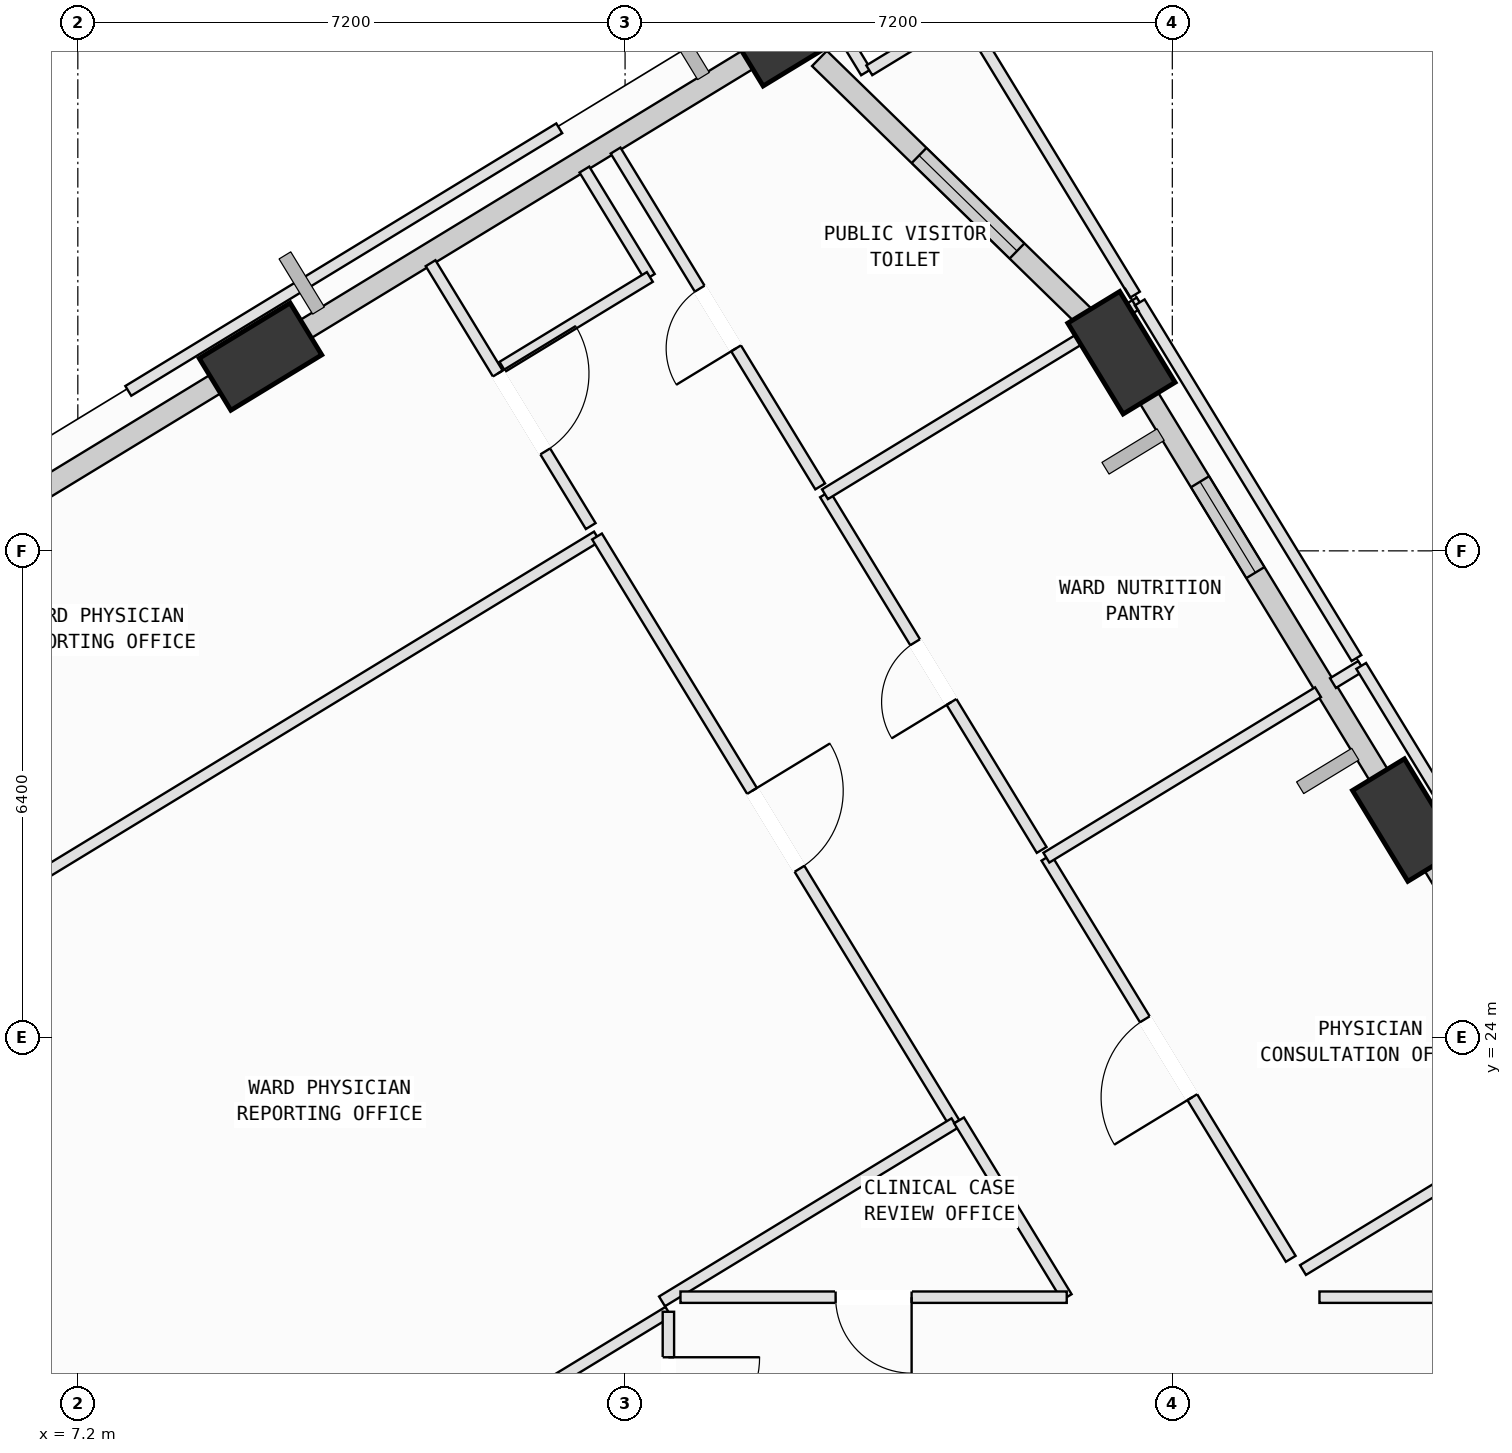
"""IFC4 building model, lengths in metres.
Left out: names, types, materials, properties, quantities, classifications, styles, units other than length and angle.
Written with IfcOpenShell. Run it as: python <this file> out.ifc"""

import sys

from ifc_helpers import new_model, si_unit, direction, frame, frame_2d, origin, origin_2d, place, context, subcontext, project, spatial, rectangle, extrude, element, fill, save


model = new_model("IFC4")
c1 = context("Model", 3, precision=1e-05, world=origin(), true_north=direction((0.0, 1.0)))
c2 = subcontext(c1, "Body", "Model", "MODEL_VIEW")
j1 = project(units=[si_unit("LENGTHUNIT", "METRE"), si_unit("PLANEANGLEUNIT", "RADIAN")], contexts=[c1])
p1 = place(None, origin())
s1 = spatial("IfcSite", under=j1, at=p1, CompositionType="ELEMENT")
p2 = place(p1, origin())
s2 = spatial("IfcBuilding", under=s1, at=p2, CompositionType="ELEMENT")
p3 = place(p2, frame((0.0, 0.0, 157.8)))
s3 = spatial("IfcBuildingStorey", under=s2, at=p3, CompositionType="ELEMENT", Elevation=157.8)
p4 = place(p3, frame((24.677, 26.858, 0.002), z_axis=(-0.008180309304, -0.037055580205, 0.999279723859), x_axis=(-0.324069376785, 0.945478073215, 0.032407593253)))
e1 = element("IfcColumn", 1, at=p4, inside=s3, PredefinedType="COLUMN", context=c2, shape_type="SweptSolid", body=[
    extrude(rectangle(XDim=1.4, YDim=0.8, at=origin_2d()), origin(), (0.0, 0.0, 1.0), 3.999),
])
p5 = place(p3, frame((20.931, 33.007, 0.002), z_axis=(-0.033534518386, -0.052679679792, 0.998048239021), x_axis=(0.018821904997, 0.998399508653, 0.053330638599)))
e2 = element("IfcColumn", 2, at=p5, inside=s3, PredefinedType="COLUMN", context=c2, shape_type="SweptSolid", body=[
    extrude(rectangle(XDim=1.4, YDim=0.8, at=origin_2d()), origin(), (0.0, 0.0, 1.0), 4.004),
])
p6 = place(p3, frame((16.606, 37.222, 0.002), z_axis=(-0.050696300595, -0.070597489424, 0.996215779635), x_axis=(0.995994383775, -0.077139317249, 0.045218505326)))
e3 = element("IfcColumn", 3, at=p6, inside=s3, PredefinedType="COLUMN", context=c2, shape_type="SweptSolid", body=[
    extrude(rectangle(XDim=1.4, YDim=0.8, at=origin_2d()), origin(), (0.0, 0.0, 1.0), 4.011),
])
p7 = place(p3, frame((9.603, 32.956, 0.002), z_axis=(-0.032808767098, -0.099155385009, 0.994530941914), x_axis=(0.973312929666, 0.222955959714, 0.054337657051)))
e4 = element("IfcColumn", 4, at=p7, inside=s3, PredefinedType="COLUMN", context=c2, shape_type="SweptSolid", body=[
    extrude(rectangle(XDim=1.4, YDim=0.8, at=origin_2d()), origin(), (0.0, 0.0, 1.0), 4.018),
])
p8 = place(p3, frame((28.479, 20.617, 0.0), z_axis=(0.0, 0.0, 1.0), x_axis=(-0.520241368048, 0.854019273185, 0.0)))
e5 = element("IfcWall", 5, at=p8, inside=s3, PredefinedType="SOLIDWALL", context=c2, shape_type="SweptSolid", body=[
    extrude(rectangle(XDim=6.76, YDim=0.28, at=frame_2d((3.38, 0.0))), origin(), (0.0, 0.0, 1.0), 3.165),
])
p9 = place(p3, frame((24.448, 27.232, 0.0), z_axis=(0.0, 0.0, 1.0), x_axis=(-0.520230695159, 0.854025774678, 0.0)))
e6 = element("IfcWall", 6, at=p9, inside=s3, PredefinedType="SOLIDWALL", context=c2, shape_type="SweptSolid", body=[
    extrude(rectangle(XDim=6.223, YDim=0.28, at=frame_2d((3.111, 0.0))), origin(), (0.0, 0.0, 1.0), 3.165),
])
p10 = place(p9, frame((3.374, 0.0, 0.75)))
e7 = element("IfcOpeningElement", 7, at=p10, cuts=e6, PredefinedType="OPENING", context=c2, shape_type="SweptSolid", body=[
    extrude(rectangle(XDim=1.4, YDim=1.85, at=frame_2d((0.7, 0.925))), frame((0.0, 0.15, 0.0), z_axis=(0.0, -1.0, 0.0), x_axis=(1.0, 0.0, 0.0)), (0.0, 0.0, 1.0), 0.3),
])
p11 = place(p3, frame((16.958, 36.879, 0.0), z_axis=(0.0, 0.0, 1.0), x_axis=(0.716061838251, -0.698036849888, 0.0)))
e8 = element("IfcWall", 8, at=p11, inside=s3, PredefinedType="SOLIDWALL", context=c2, shape_type="SweptSolid", body=[
    extrude(rectangle(XDim=5.093, YDim=0.28, at=frame_2d((2.546, 0.0))), origin(), (0.0, 0.0, 1.0), 3.165),
])
p12 = place(p11, frame((1.83, 0.0, 0.75)))
e9 = element("IfcOpeningElement", 9, at=p12, cuts=e8, PredefinedType="OPENING", context=c2, shape_type="SweptSolid", body=[
    extrude(rectangle(XDim=1.8, YDim=2.05, at=frame_2d((0.9, 1.025))), frame((0.0, 0.15, 0.0), z_axis=(0.0, -1.0, 0.0), x_axis=(1.0, 0.0, 0.0)), (0.0, 0.0, 1.0), 0.3),
])
p13 = place(p3, frame((9.874, 33.121, 0.0), z_axis=(0.0, 0.0, 1.0), x_axis=(0.854014635071, 0.52024898182, 0.0)))
e10 = element("IfcWall", 10, at=p13, inside=s3, PredefinedType="SOLIDWALL", context=c2, shape_type="SweptSolid", body=[
    extrude(rectangle(XDim=7.231, YDim=0.28, at=frame_2d((3.615, 0.0))), origin(), (0.0, 0.0, 1.0), 3.165),
])
p14 = place(p3, frame((2.851, 28.842, 0.0), z_axis=(0.0, 0.0, 1.0), x_axis=(0.854006543664, 0.520262264036, 0.0)))
e11 = element("IfcWall", 11, at=p14, inside=s3, PredefinedType="SOLIDWALL", context=c2, shape_type="SweptSolid", body=[
    extrude(rectangle(XDim=7.27, YDim=0.28, at=frame_2d((3.635, 0.0))), origin(), (0.0, 0.0, 1.0), 3.165),
])
p15 = place(p3, frame((7.173, 15.638, 0.0), z_axis=(0.0, 0.0, 1.0), x_axis=(0.854000204459, 0.52027266965, 0.0)))
e12 = element("IfcWall", 12, at=p15, inside=s3, PredefinedType="PARTITIONING", context=c2, shape_type="SweptSolid", body=[
    extrude(rectangle(XDim=9.13, YDim=0.15, at=frame_2d((4.565, 0.0))), origin(), (0.0, 0.0, 1.0), 3.78),
])
p16 = place(p3, frame((14.97, 20.388, 0.0), z_axis=(0.0, 0.0, 1.0), x_axis=(0.0, -1.0, 0.0)))
e13 = element("IfcWall", 13, at=p16, inside=s3, PredefinedType="PARTITIONING", context=c2, shape_type="SweptSolid", body=[
    extrude(rectangle(XDim=2.158, YDim=0.15, at=frame_2d((1.079, 0.0))), origin(), (0.0, 0.0, 1.0), 3.78),
])
p17 = place(p16, frame((0.598, 0.0, 0.0)))
e14 = element("IfcOpeningElement", 14, at=p17, cuts=e13, PredefinedType="OPENING", context=c2, shape_type="SweptSolid", body=[
    extrude(rectangle(XDim=1.2, YDim=2.15, at=frame_2d((0.6, 1.075))), frame((0.0, 0.085, 0.0), z_axis=(0.0, -1.0, 0.0), x_axis=(1.0, 0.0, 0.0)), (0.0, 0.0, 1.0), 0.17),
])
p18 = place(p3, frame((2.092, 23.316, 0.0), z_axis=(0.0, 0.0, 1.0), x_axis=(0.854007963695, 0.520259933059, 0.0)))
e15 = element("IfcWall", 15, at=p18, inside=s3, PredefinedType="PARTITIONING", context=c2, shape_type="SweptSolid", body=[
    extrude(rectangle(XDim=13.98, YDim=0.15, at=frame_2d((6.99, 0.0))), origin(), (0.0, 0.0, 1.0), 3.78),
])
p19 = place(p3, frame((14.031, 30.589, 0.0), z_axis=(0.0, 0.0, 1.0), x_axis=(0.520239078164, -0.854020668105, 0.0)))
e16 = element("IfcWall", 16, at=p19, inside=s3, PredefinedType="PARTITIONING", context=c2, shape_type="SweptSolid", body=[
    extrude(rectangle(XDim=9.04, YDim=0.15, at=frame_2d((4.52, 0.0))), origin(), (0.0, 0.0, 1.0), 3.78),
])
p20 = place(p19, frame((3.92, 0.0, 0.0)))
e17 = element("IfcOpeningElement", 17, at=p20, cuts=e16, PredefinedType="OPENING", context=c2, shape_type="SweptSolid", body=[
    extrude(rectangle(XDim=1.2, YDim=2.15, at=frame_2d((0.6, 1.075))), frame((0.0, 0.085, 0.0), z_axis=(0.0, -1.0, 0.0), x_axis=(1.0, 0.0, 0.0)), (0.0, 0.0, 1.0), 0.17),
])
p21 = place(p3, frame((18.734, 22.869, 0.0), z_axis=(0.0, 0.0, 1.0), x_axis=(-0.854021673807, -0.520237427208, 0.0)))
e18 = element("IfcWall", 18, at=p21, inside=s3, PredefinedType="PARTITIONING", context=c2, shape_type="SweptSolid", body=[
    extrude(rectangle(XDim=4.506, YDim=0.15, at=frame_2d((2.253, 0.0))), origin(), (0.0, 0.0, 1.0), 3.78),
])
p22 = place(p3, frame((8.971, 32.77, 0.0), z_axis=(0.0, 0.0, 1.0), x_axis=(0.854178789285, 0.519979418762, 0.0)))
e19 = element("IfcWall", 19, at=p22, inside=s3, PredefinedType="PARTITIONING", context=c2, shape_type="SweptSolid", body=[
    extrude(rectangle(XDim=0.954, YDim=0.15, at=frame_2d((0.477, 0.0))), origin(), (0.0, 0.0, 1.0), 3.78),
])
p23 = place(p3, frame((11.841, 34.185, 0.0), z_axis=(0.0, 0.0, 1.0), x_axis=(0.520210820935, -0.854037880765, 0.0)))
e20 = element("IfcWall", 20, at=p23, inside=s3, PredefinedType="PARTITIONING", context=c2, shape_type="SweptSolid", body=[
    extrude(rectangle(XDim=4.05, YDim=0.15, at=frame_2d((2.025, 0.0))), origin(), (0.0, 0.0, 1.0), 3.78),
])
p24 = place(p23, frame((1.7, 0.0, 0.0)))
e21 = element("IfcOpeningElement", 21, at=p24, cuts=e20, PredefinedType="OPENING", context=c2, shape_type="SweptSolid", body=[
    extrude(rectangle(XDim=1.2, YDim=2.15, at=frame_2d((0.6, 1.075))), frame((0.0, 0.085, 0.0), z_axis=(0.0, -1.0, 0.0), x_axis=(1.0, 0.0, 0.0)), (0.0, 0.0, 1.0), 0.17),
])
p25 = place(p3, frame((27.809, 20.579, 0.0), z_axis=(0.0, 0.0, 1.0), x_axis=(-0.999999973887, 0.000228532246, 0.0)))
e22 = element("IfcWall", 22, at=p25, inside=s3, PredefinedType="PARTITIONING", context=c2, shape_type="SweptSolid", body=[
    extrude(rectangle(XDim=4.273, YDim=0.15, at=frame_2d((2.137, 0.0))), origin(), (0.0, 0.0, 1.0), 3.78),
])
p26 = place(p25, frame((1.636, 0.0, 0.0)))
e23 = element("IfcOpeningElement", 23, at=p26, cuts=e22, PredefinedType="OPENING", context=c2, shape_type="SweptSolid", body=[
    extrude(rectangle(XDim=1.0, YDim=2.12, at=frame_2d((0.5, 1.06))), frame((0.0, 0.085, 0.0), z_axis=(0.0, -1.0, 0.0), x_axis=(1.0, 0.0, 0.0)), (0.0, 0.0, 1.0), 0.17),
])
p27 = place(p3, frame((23.319, 20.937, 0.0), z_axis=(0.0, 0.0, 1.0), x_axis=(0.853962989995, 0.520333750316, 0.0)))
e24 = element("IfcWall", 24, at=p27, inside=s3, PredefinedType="PARTITIONING", context=c2, shape_type="SweptSolid", body=[
    extrude(rectangle(XDim=4.124, YDim=0.15, at=frame_2d((2.062, 0.0))), origin(), (0.0, 0.0, 1.0), 3.78),
])
p28 = place(p3, frame((23.158, 21.085, 0.0), z_axis=(0.0, 0.0, 1.0), x_axis=(-0.520195067616, 0.854047476214, 0.0)))
e25 = element("IfcWall", 25, at=p28, inside=s3, PredefinedType="PARTITIONING", context=c2, shape_type="SweptSolid", body=[
    extrude(rectangle(XDim=6.18, YDim=0.15, at=frame_2d((3.09, 0.0))), origin(), (0.0, 0.0, 1.0), 3.78),
])
p29 = place(p28, frame((2.49, 0.0, 0.0)))
e26 = element("IfcOpeningElement", 26, at=p29, cuts=e25, PredefinedType="OPENING", context=c2, shape_type="SweptSolid", body=[
    extrude(rectangle(XDim=1.2, YDim=2.15, at=frame_2d((0.6, 1.075))), frame((0.0, 0.085, 0.0), z_axis=(0.0, -1.0, 0.0), x_axis=(1.0, 0.0, 0.0)), (0.0, 0.0, 1.0), 0.17),
])
p30 = place(p3, frame((19.943, 26.363, 0.0), z_axis=(0.0, 0.0, 1.0), x_axis=(0.854035162243, 0.520215283948, 0.0)))
e27 = element("IfcWall", 27, at=p30, inside=s3, PredefinedType="PARTITIONING", context=c2, shape_type="SweptSolid", body=[
    extrude(rectangle(XDim=4.185, YDim=0.15, at=frame_2d((2.092, 0.0))), origin(), (0.0, 0.0, 1.0), 3.78),
])
p31 = place(p3, frame((23.714, 28.66, 0.0), z_axis=(0.0, 0.0, 1.0), x_axis=(0.853851017382, 0.520517473401, 0.0)))
e28 = element("IfcWall", 28, at=p31, inside=s3, PredefinedType="PARTITIONING", context=c2, shape_type="SweptSolid", body=[
    extrude(rectangle(XDim=0.434, YDim=0.15, at=frame_2d((0.217, 0.0))), origin(), (0.0, 0.0, 1.0), 3.78),
])
p32 = place(p3, frame((24.085, 28.886, 0.0), z_axis=(0.0, 0.0, 1.0), x_axis=(0.520223881185, -0.85402992538, 0.0)))
e29 = element("IfcWall", 29, at=p32, inside=s3, PredefinedType="PARTITIONING", context=c2, shape_type="SweptSolid", body=[
    extrude(rectangle(XDim=6.18, YDim=0.15, at=frame_2d((3.09, 0.0))), origin(), (0.0, 0.0, 1.0), 3.78),
])
p33 = place(p3, frame((19.881, 26.465, 0.0), z_axis=(0.0, 0.0, 1.0), x_axis=(-0.520269153485, 0.854002346561, 0.0)))
e30 = element("IfcWall", 30, at=p33, inside=s3, PredefinedType="PARTITIONING", context=c2, shape_type="SweptSolid", body=[
    extrude(rectangle(XDim=5.48, YDim=0.15, at=frame_2d((2.74, 0.0))), origin(), (0.0, 0.0, 1.0), 3.78),
])
p34 = place(p33, frame((2.28, 0.0, 0.0)))
e31 = element("IfcOpeningElement", 31, at=p34, cuts=e30, PredefinedType="OPENING", context=c2, shape_type="SweptSolid", body=[
    extrude(rectangle(XDim=0.92, YDim=2.1, at=frame_2d((0.46, 1.05))), frame((0.0, 0.085, 0.0), z_axis=(0.0, -1.0, 0.0), x_axis=(1.0, 0.0, 0.0)), (0.0, 0.0, 1.0), 0.17),
])
p35 = place(p3, frame((17.03, 31.145, 0.0), z_axis=(0.0, 0.0, 1.0), x_axis=(0.853935379197, 0.520379061988, 0.0)))
e32 = element("IfcWall", 32, at=p35, inside=s3, PredefinedType="PARTITIONING", context=c2, shape_type="SweptSolid", body=[
    extrude(rectangle(XDim=4.068, YDim=0.15, at=frame_2d((2.034, 0.0))), origin(), (0.0, 0.0, 1.0), 3.78),
])
p36 = place(p3, frame((20.703, 33.384, 0.0), z_axis=(0.0, 0.0, 1.0), x_axis=(0.854172741776, 0.519989352975, 0.0)))
e33 = element("IfcWall", 33, at=p36, inside=s3, PredefinedType="PARTITIONING", context=c2, shape_type="SweptSolid", body=[
    extrude(rectangle(XDim=0.548, YDim=0.15, at=frame_2d((0.274, 0.0))), origin(), (0.0, 0.0, 1.0), 3.78),
])
p37 = place(p3, frame((21.171, 33.669, 0.0), z_axis=(0.0, 0.0, 1.0), x_axis=(0.520399103796, -0.853923165611, 0.0)))
e34 = element("IfcWall", 34, at=p37, inside=s3, PredefinedType="PARTITIONING", context=c2, shape_type="SweptSolid", body=[
    extrude(rectangle(XDim=5.48, YDim=0.15, at=frame_2d((2.74, 0.0))), origin(), (0.0, 0.0, 1.0), 3.78),
])
p38 = place(p3, frame((18.851, 37.478, 0.0), z_axis=(0.0, 0.0, 1.0), x_axis=(0.52017533127, -0.854059497189, 0.0)))
e35 = element("IfcWall", 35, at=p38, inside=s3, PredefinedType="PARTITIONING", context=c2, shape_type="SweptSolid", body=[
    extrude(rectangle(XDim=4.341, YDim=0.15, at=frame_2d((2.17, 0.0))), origin(), (0.0, 0.0, 1.0), 3.78),
])
p39 = place(p3, frame((16.967, 31.248, 0.0), z_axis=(0.0, 0.0, 1.0), x_axis=(-0.520277703675, 0.853997137618, 0.0)))
e36 = element("IfcWall", 36, at=p39, inside=s3, PredefinedType="PARTITIONING", context=c2, shape_type="SweptSolid", body=[
    extrude(rectangle(XDim=5.174, YDim=0.15, at=frame_2d((2.587, 0.0))), origin(), (0.0, 0.0, 1.0), 3.78),
])
p40 = place(p39, frame((2.127, 0.0, 0.0)))
e37 = element("IfcOpeningElement", 37, at=p40, cuts=e36, PredefinedType="OPENING", context=c2, shape_type="SweptSolid", body=[
    extrude(rectangle(XDim=0.92, YDim=2.1, at=frame_2d((0.46, 1.05))), frame((0.0, 0.085, 0.0), z_axis=(0.0, -1.0, 0.0), x_axis=(1.0, 0.0, 0.0)), (0.0, 0.0, 1.0), 0.17),
])
p41 = place(p3, frame((17.003, 37.628, 0.0), z_axis=(0.0, 0.0, 1.0), x_axis=(0.52028085322, -0.853995218823, 0.0)))
e38 = element("IfcWall", 38, at=p41, inside=s3, PredefinedType="PARTITIONING", context=c2, shape_type="SweptSolid", body=[
    extrude(rectangle(XDim=1.09, YDim=0.15, at=frame_2d((0.545, 0.0))), origin(), (0.0, 0.0, 1.0), 3.78),
])
p42 = place(p3, frame((17.613, 36.723, 0.0), z_axis=(0.0, 0.0, 1.0), x_axis=(0.85369973311, 0.520765557317, 0.0)))
e39 = element("IfcWall", 39, at=p42, inside=s3, PredefinedType="PARTITIONING", context=c2, shape_type="SweptSolid", body=[
    extrude(rectangle(XDim=1.4, YDim=0.15, at=frame_2d((0.7, 0.0))), origin(), (0.0, 0.0, 1.0), 3.78),
])
p43 = place(p3, frame((7.864, 32.505, 0.0), z_axis=(0.0, 0.0, 1.0), x_axis=(0.853942838584, 0.520366821032, 0.0)))
e40 = element("IfcWall", 40, at=p43, inside=s3, PredefinedType="PARTITIONING", context=c2, shape_type="SweptSolid", body=[
    extrude(rectangle(XDim=6.64, YDim=0.15, at=frame_2d((3.32, 0.0))), origin(), (0.0, 0.0, 1.0), 3.78),
])
p44 = place(p3, frame((13.865, 35.417, 0.0), z_axis=(0.0, 0.0, 1.0), x_axis=(0.520363448518, -0.853944893683, 0.0)))
e41 = element("IfcWall", 41, at=p44, inside=s3, PredefinedType="PARTITIONING", context=c2, shape_type="SweptSolid", body=[
    extrude(rectangle(XDim=1.655, YDim=0.15, at=frame_2d((0.827, 0.0))), origin(), (0.0, 0.0, 1.0), 3.78),
])
p45 = place(p3, frame((14.726, 34.004, 0.0), z_axis=(0.0, 0.0, 1.0), x_axis=(-0.854067702897, -0.520161858337, 0.0)))
e42 = element("IfcWall", 42, at=p45, inside=s3, PredefinedType="PARTITIONING", context=c2, shape_type="SweptSolid", body=[
    extrude(rectangle(XDim=2.27, YDim=0.15, at=frame_2d((1.135, 0.0))), origin(), (0.0, 0.0, 1.0), 3.78),
])
p46 = place(p3, frame((18.794, 22.906, 0.0), z_axis=(0.0, 0.0, 1.0), x_axis=(0.520271097481, -0.854001162251, 0.0)))
e43 = element("IfcWall", 43, at=p46, inside=s3, PredefinedType="PARTITIONING", context=c2, shape_type="SweptSolid", body=[
    extrude(rectangle(XDim=2.724, YDim=0.15, at=frame_2d((1.362, 0.0))), origin(), (0.0, 0.0, 1.0), 3.78),
])
p47 = place(p3, frame((20.211, 20.58, 0.0), z_axis=(0.0, 0.0, 1.0), x_axis=(-1.0, 0.0, 0.0)))
e44 = element("IfcWall", 44, at=p47, inside=s3, PredefinedType="PARTITIONING", context=c2, shape_type="SweptSolid", body=[
    extrude(rectangle(XDim=5.082, YDim=0.15, at=frame_2d((2.541, 0.0))), origin(), (0.0, 0.0, 1.0), 3.78),
])
p48 = place(p47, frame((2.041, 0.0, 0.0)))
e45 = element("IfcOpeningElement", 45, at=p48, cuts=e44, PredefinedType="OPENING", context=c2, shape_type="SweptSolid", body=[
    extrude(rectangle(XDim=1.0, YDim=2.12, at=frame_2d((0.5, 1.06))), frame((0.0, 0.085, 0.0), z_axis=(0.0, -1.0, 0.0), x_axis=(1.0, 0.0, 0.0)), (0.0, 0.0, 1.0), 0.17),
])
p49 = place(p10, origin())
e46 = element("IfcWindow", 46, at=p49, inside=s3, PartitioningType="SINGLE_PANEL", PredefinedType="WINDOW", context=c2, shape_type="SweptSolid", body=[
    extrude(rectangle(XDim=1.4, YDim=1.85, at=frame_2d((0.7, 0.925))), frame((0.0, 0.03, 0.0), z_axis=(0.0, -1.0, 0.0), x_axis=(1.0, 0.0, 0.0)), (0.0, 0.0, 1.0), 0.06),
])
fill(e7, e46)
p50 = place(p12, origin())
e47 = element("IfcWindow", 47, at=p50, inside=s3, PartitioningType="SINGLE_PANEL", PredefinedType="WINDOW", context=c2, shape_type="SweptSolid", body=[
    extrude(rectangle(XDim=1.8, YDim=2.05, at=frame_2d((0.9, 1.025))), frame((0.0, 0.03, 0.0), z_axis=(0.0, -1.0, 0.0), x_axis=(1.0, 0.0, 0.0)), (0.0, 0.0, 1.0), 0.06),
])
fill(e9, e47)
p51 = place(p17, origin())
e48 = element("IfcDoor", 48, at=p51, inside=s3, OperationType="SINGLE_SWING_LEFT", PredefinedType="DOOR", context=c2, shape_type="SweptSolid", body=[
    extrude(rectangle(XDim=1.2, YDim=2.15, at=frame_2d((0.6, 1.075))), frame((0.0, 0.025, 0.0), z_axis=(0.0, -1.0, 0.0), x_axis=(1.0, 0.0, 0.0)), (0.0, 0.0, 1.0), 0.05),
])
fill(e14, e48)
p52 = place(p20, origin())
e49 = element("IfcDoor", 49, at=p52, inside=s3, OperationType="SINGLE_SWING_LEFT", PredefinedType="DOOR", context=c2, shape_type="SweptSolid", body=[
    extrude(rectangle(XDim=1.2, YDim=2.15, at=frame_2d((0.6, 1.075))), frame((0.0, 0.025, 0.0), z_axis=(0.0, -1.0, 0.0), x_axis=(1.0, 0.0, 0.0)), (0.0, 0.0, 1.0), 0.05),
])
fill(e17, e49)
p53 = place(p24, origin())
e50 = element("IfcDoor", 50, at=p53, inside=s3, OperationType="SINGLE_SWING_LEFT", PredefinedType="DOOR", context=c2, shape_type="SweptSolid", body=[
    extrude(rectangle(XDim=1.2, YDim=2.15, at=frame_2d((0.6, 1.075))), frame((0.0, 0.025, 0.0), z_axis=(0.0, -1.0, 0.0), x_axis=(1.0, 0.0, 0.0)), (0.0, 0.0, 1.0), 0.05),
])
fill(e21, e50)
p54 = place(p29, origin())
e51 = element("IfcDoor", 51, at=p54, inside=s3, OperationType="SINGLE_SWING_LEFT", PredefinedType="DOOR", context=c2, shape_type="SweptSolid", body=[
    extrude(rectangle(XDim=1.2, YDim=2.15, at=frame_2d((0.6, 1.075))), frame((0.0, 0.025, 0.0), z_axis=(0.0, -1.0, 0.0), x_axis=(1.0, 0.0, 0.0)), (0.0, 0.0, 1.0), 0.05),
])
fill(e26, e51)
p55 = place(p34, origin())
e52 = element("IfcDoor", 52, at=p55, inside=s3, OperationType="SINGLE_SWING_LEFT", PredefinedType="DOOR", context=c2, shape_type="SweptSolid", body=[
    extrude(rectangle(XDim=0.92, YDim=2.1, at=frame_2d((0.46, 1.05))), frame((0.0, 0.025, 0.0), z_axis=(0.0, -1.0, 0.0), x_axis=(1.0, 0.0, 0.0)), (0.0, 0.0, 1.0), 0.05),
])
fill(e31, e52)
p56 = place(p40, origin())
e53 = element("IfcDoor", 53, at=p56, inside=s3, OperationType="SINGLE_SWING_LEFT", PredefinedType="DOOR", context=c2, shape_type="SweptSolid", body=[
    extrude(rectangle(XDim=0.92, YDim=2.1, at=frame_2d((0.46, 1.05))), frame((0.0, 0.025, 0.0), z_axis=(0.0, -1.0, 0.0), x_axis=(1.0, 0.0, 0.0)), (0.0, 0.0, 1.0), 0.05),
])
fill(e37, e53)
p57 = place(p48, origin())
e54 = element("IfcDoor", 54, at=p57, inside=s3, OperationType="SINGLE_SWING_LEFT", PredefinedType="DOOR", context=c2, shape_type="SweptSolid", body=[
    extrude(rectangle(XDim=1.0, YDim=2.12, at=frame_2d((0.5, 1.06))), frame((0.0, 0.025, 0.0), z_axis=(0.0, -1.0, 0.0), x_axis=(1.0, 0.0, 0.0)), (0.0, 0.0, 1.0), 0.05),
])
fill(e45, e54)
save(model, sys.argv[1])
